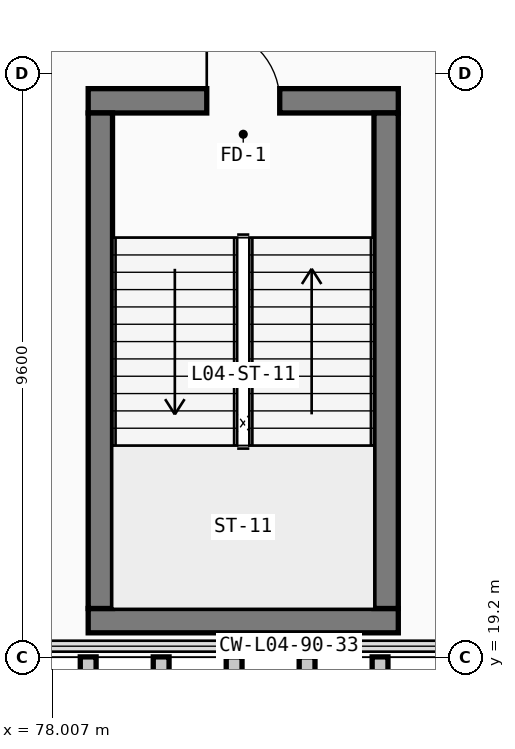
"""IFC4 building model, lengths in metres.
Left out: names, types, materials, properties, quantities, classifications, styles, units other than length and angle.
Written with IfcOpenShell. Run it as: python <this file> out.ifc"""

import sys

from ifc_helpers import new_model, si_unit, direction, frame, frame_2d, origin, place, context, subcontext, project, spatial, rectangle, extrude, element, fill, save


model = new_model("IFC4")
c1 = context("Model", 3, precision=1e-05, world=origin(), true_north=direction((0.0, 1.0)))
c2 = subcontext(c1, "Body", "Model", "MODEL_VIEW")
j1 = project(units=[si_unit("LENGTHUNIT", "METRE"), si_unit("PLANEANGLEUNIT", "RADIAN")], contexts=[c1])
p1 = place(None, origin())
s1 = spatial("IfcSite", under=j1, at=p1, CompositionType="ELEMENT")
p2 = place(p1, origin())
s2 = spatial("IfcBuilding", under=s1, at=p2, CompositionType="ELEMENT")
p3 = place(p2, frame((0.0, 0.0, 18.6)))
s3 = spatial("IfcBuildingStorey", under=s2, at=p3, CompositionType="ELEMENT", Elevation=18.6)
p4 = place(p3, frame((78.6, 19.8, 0.0), z_axis=(0.0, 0.0, 1.0), x_axis=(1.0, 0.0, 0.0)))
e1 = element("IfcWall", 1, at=p4, inside=s3, PredefinedType="SHEAR", context=c2, shape_type="SweptSolid", body=[
    extrude(rectangle(XDim=5.1, YDim=0.4, at=frame_2d((2.55, 0.0))), origin(), (0.0, 0.0, 1.0), 4.24),
])
p5 = place(p3, frame((83.7, 28.35, 0.0), z_axis=(0.0, 0.0, 1.0), x_axis=(-1.0, 0.0, 0.0)))
e2 = element("IfcWall", 2, at=p5, inside=s3, PredefinedType="SHEAR", context=c2, shape_type="SweptSolid", body=[
    extrude(rectangle(XDim=5.1, YDim=0.4, at=frame_2d((2.55, 0.0))), origin(), (0.0, 0.0, 1.0), 4.24),
])
p6 = place(p5, frame((3.15, 0.0, 0.0), z_axis=(0.0, 0.0, 1.0), x_axis=(-1.0, 0.0, 0.0)))
e3 = element("IfcOpeningElement", 3, at=p6, cuts=e2, PredefinedType="OPENING", context=c2, shape_type="SweptSolid", body=[
    extrude(rectangle(XDim=1.2, YDim=2.2, at=frame_2d((0.6, 1.1))), frame((0.0, 0.21, 0.0), z_axis=(0.0, -1.0, 0.0), x_axis=(1.0, 0.0, 0.0)), (0.0, 0.0, 1.0), 0.42),
])
for number, where, z_axis, x_axis in (
    (4, (78.8, 28.15, 0.0), (0.0, 0.0, 1.0), (0.0, -1.0, 0.0)),
    (5, (83.5, 20.0, 0.0), (0.0, 0.0, 1.0), (0.0, 1.0, 0.0)),
):
    element("IfcWall", number, at=place(p3, frame(where, z_axis=z_axis, x_axis=x_axis)), inside=s3, PredefinedType="SHEAR", context=c2, shape_type="SweptSolid", body=[
        extrude(rectangle(XDim=8.15, YDim=0.4, at=frame_2d((4.075, 0.0))), origin(), (0.0, 0.0, 1.0), 4.24),
    ])
p7 = place(p6, origin())
e6 = element("IfcDoor", 6, at=p7, inside=s3, OperationType="SINGLE_SWING_LEFT", PredefinedType="DOOR", context=c2, shape_type="SweptSolid", body=[
    extrude(rectangle(XDim=1.2, YDim=2.2, at=frame_2d((0.6, 1.1))), frame((0.0, 0.025, 0.0), z_axis=(0.0, -1.0, 0.0), x_axis=(1.0, 0.0, 0.0)), (0.0, 0.0, 1.0), 0.05),
])
fill(e3, e6)
save(model, sys.argv[1])
